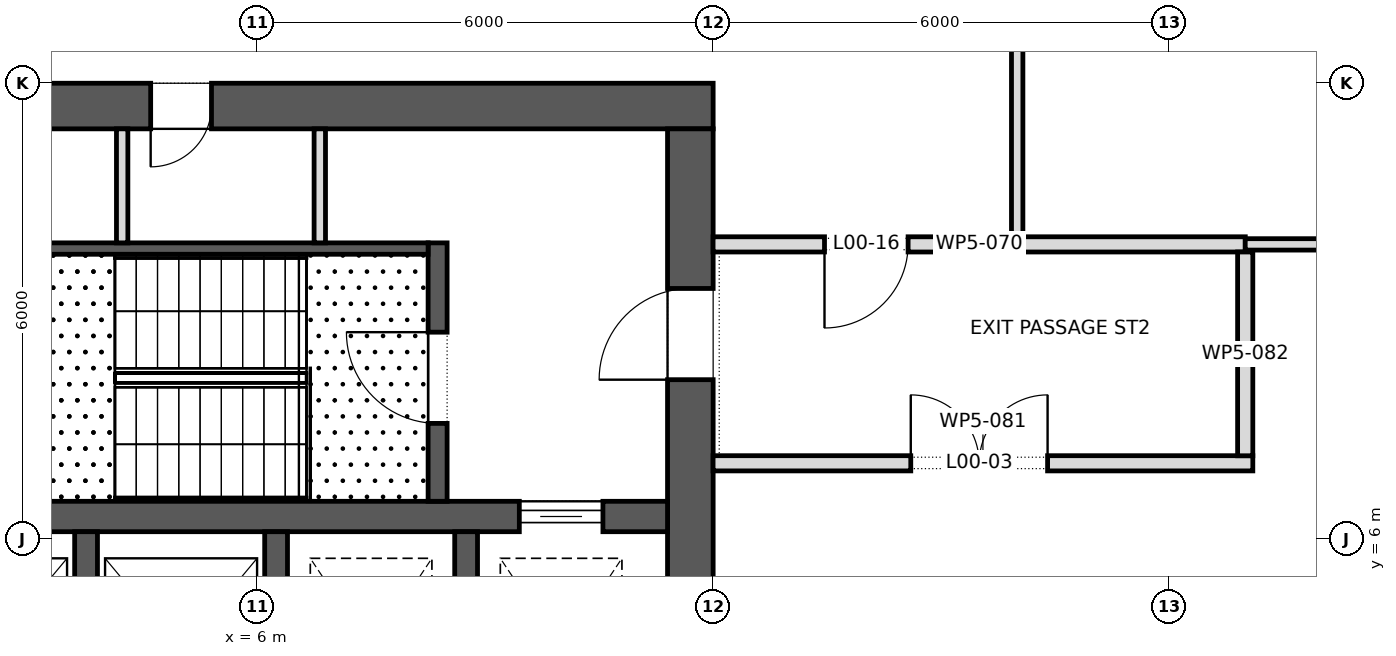
"""IFC4 building model, lengths in metres.
Left out: names, types, materials, properties, quantities, classifications, styles, units other than length and angle.
Written with IfcOpenShell. Run it as: python <this file> out.ifc"""

import sys

from ifc_helpers import new_model, si_unit, direction, frame, frame_2d, origin, place, context, subcontext, project, spatial, polyline, rectangle, outline, extrude, element, fill, save


model = new_model("IFC4")
c1 = context("Model", 3, precision=1e-05, world=origin(), true_north=direction((0.0, 1.0)))
c2 = subcontext(c1, "Body", "Model", "MODEL_VIEW")
j1 = project(units=[si_unit("LENGTHUNIT", "METRE"), si_unit("PLANEANGLEUNIT", "RADIAN")], contexts=[c1])
p1 = place(None, origin())
s1 = spatial("IfcSite", under=j1, at=p1, CompositionType="ELEMENT")
p2 = place(p1, origin())
s2 = spatial("IfcBuilding", under=s1, at=p2, CompositionType="ELEMENT")
p3 = place(p2, origin())
s3 = spatial("IfcBuildingStorey", under=s2, at=p3, CompositionType="ELEMENT", Elevation=0.0)
p4 = place(p3, frame((-12.0, 11.7, 0.0), z_axis=(0.0, 0.0, 1.0), x_axis=(1.0, 0.0, 0.0)))
e1 = element("IfcWall", 1, at=p4, inside=s3, PredefinedType="SHEAR", context=c2, shape_type="SweptSolid", body=[
    extrude(rectangle(XDim=24.0, YDim=0.6, at=frame_2d((12.0, 0.0))), origin(), (0.0, 0.0, 1.0), 7.0),
])
p5 = place(p4, frame((9.225, 0.0, 0.0)))
e2 = element("IfcOpeningElement", 2, at=p5, cuts=e1, PredefinedType="OPENING", context=c2, shape_type="SweptSolid", body=[
    extrude(rectangle(XDim=0.9, YDim=2.1, at=frame_2d((0.45, 1.05))), frame((0.0, 0.312, 0.0), z_axis=(0.0, -1.0, 0.0), x_axis=(1.0, 0.0, 0.0)), (0.0, 0.0, 1.0), 0.624),
])
p6 = place(p4, frame((10.925, 0.0, 0.0)))
e3 = element("IfcOpeningElement", 3, at=p6, cuts=e1, PredefinedType="OPENING", context=c2, shape_type="SweptSolid", body=[
    extrude(rectangle(XDim=0.8, YDim=2.1, at=frame_2d((0.4, 1.05))), frame((0.0, 0.312, 0.0), z_axis=(0.0, -1.0, 0.0), x_axis=(1.0, 0.0, 0.0)), (0.0, 0.0, 1.0), 0.624),
])
p7 = place(p4, frame((4.2, 0.0, 0.0)))
e4 = element("IfcOpeningElement", 4, at=p7, cuts=e1, PredefinedType="OPENING", context=c2, shape_type="SweptSolid", body=[
    extrude(rectangle(XDim=0.8, YDim=2.1, at=frame_2d((0.4, 1.05))), frame((0.0, 0.312, 0.0), z_axis=(0.0, -1.0, 0.0), x_axis=(1.0, 0.0, 0.0)), (0.0, 0.0, 1.0), 0.624),
])
p8 = place(p4, frame((13.8, 0.0, 0.0)))
e5 = element("IfcOpeningElement", 5, at=p8, cuts=e1, PredefinedType="OPENING", context=c2, shape_type="SweptSolid", body=[
    extrude(rectangle(XDim=0.8, YDim=2.1, at=frame_2d((0.4, 1.05))), frame((0.0, 0.312, 0.0), z_axis=(0.0, -1.0, 0.0), x_axis=(1.0, 0.0, 0.0)), (0.0, 0.0, 1.0), 0.624),
])
p9 = place(p4, frame((16.6, 0.0, 0.0)))
e6 = element("IfcOpeningElement", 6, at=p9, cuts=e1, PredefinedType="OPENING", context=c2, shape_type="SweptSolid", body=[
    extrude(rectangle(XDim=0.8, YDim=2.1, at=frame_2d((0.4, 1.05))), frame((0.0, 0.312, 0.0), z_axis=(0.0, -1.0, 0.0), x_axis=(1.0, 0.0, 0.0)), (0.0, 0.0, 1.0), 0.624),
])
p10 = place(p3, frame((11.7, -11.4, 0.0), z_axis=(0.0, 0.0, 1.0), x_axis=(0.0, 1.0, 0.0)))
e7 = element("IfcWall", 7, at=p10, inside=s3, PredefinedType="SHEAR", context=c2, shape_type="SweptSolid", body=[
    extrude(rectangle(XDim=22.8, YDim=0.6, at=frame_2d((11.4, 0.0))), origin(), (0.0, 0.0, 1.0), 7.0),
])
p11 = place(p10, frame((10.2, 0.0, 0.0)))
e8 = element("IfcOpeningElement", 8, at=p11, cuts=e7, PredefinedType="OPENING", context=c2, shape_type="SweptSolid", body=[
    extrude(rectangle(XDim=2.4, YDim=2.1, at=frame_2d((1.2, 1.05))), frame((0.0, 0.312, 0.0), z_axis=(0.0, -1.0, 0.0), x_axis=(1.0, 0.0, 0.0)), (0.0, 0.0, 1.0), 0.624),
])
p12 = place(p10, frame((19.5, 0.0, 0.0)))
e9 = element("IfcOpeningElement", 9, at=p12, cuts=e7, PredefinedType="OPENING", context=c2, shape_type="SweptSolid", body=[
    extrude(rectangle(XDim=1.2, YDim=2.1, at=frame_2d((0.6, 1.05))), frame((0.0, 0.312, 0.0), z_axis=(0.0, -1.0, 0.0), x_axis=(1.0, 0.0, 0.0)), (0.0, 0.0, 1.0), 0.624),
])
p13 = place(p10, frame((2.1, 0.0, 0.0)))
e10 = element("IfcOpeningElement", 10, at=p13, cuts=e7, PredefinedType="OPENING", context=c2, shape_type="SweptSolid", body=[
    extrude(rectangle(XDim=1.2, YDim=2.1, at=frame_2d((0.6, 1.05))), frame((0.0, 0.312, 0.0), z_axis=(0.0, -1.0, 0.0), x_axis=(1.0, 0.0, 0.0)), (0.0, 0.0, 1.0), 0.624),
])
p14 = place(p3, frame((-11.4, 6.3, 0.0), z_axis=(0.0, 0.0, 1.0), x_axis=(1.0, 0.0, 0.0)))
e11 = element("IfcWall", 11, at=p14, inside=s3, PredefinedType="SHEAR", context=c2, shape_type="SweptSolid", body=[
    extrude(rectangle(XDim=22.8, YDim=0.4, at=frame_2d((11.4, 0.0))), origin(), (0.0, 0.0, 1.0), 7.0),
])
p15 = place(p14, frame((20.85, 0.0, 0.0)))
e12 = element("IfcOpeningElement", 12, at=p15, cuts=e11, PredefinedType="OPENING", context=c2, shape_type="SweptSolid", body=[
    extrude(rectangle(XDim=1.1, YDim=2.1, at=frame_2d((0.55, 1.05))), frame((0.0, 0.212, 0.0), z_axis=(0.0, -1.0, 0.0), x_axis=(1.0, 0.0, 0.0)), (0.0, 0.0, 1.0), 0.424),
])
for number, where, z_axis, x_axis in (
    (13, (3.75, 3.2, 0.0), (0.0, 0.0, 1.0), (0.0, 1.0, 0.0)),
    (14, (6.25, 3.2, 0.0), (0.0, 0.0, 1.0), (0.0, 1.0, 0.0)),
    (15, (8.75, 3.2, 0.0), (0.0, 0.0, 1.0), (0.0, 1.0, 0.0)),
):
    element("IfcWall", number, at=place(p3, frame(where, z_axis=z_axis, x_axis=x_axis)), inside=s3, PredefinedType="SHEAR", context=c2, shape_type="SweptSolid", body=[
        extrude(rectangle(XDim=2.9, YDim=0.3, at=frame_2d((1.45, 0.0))), origin(), (0.0, 0.0, 1.0), 7.0),
    ])
p16 = place(p3, frame((8.375, 6.5, 0.0), z_axis=(0.0, 0.0, 1.0), x_axis=(0.0, 1.0, 0.0)))
e16 = element("IfcWall", 16, at=p16, inside=s3, PredefinedType="SHEAR", context=c2, shape_type="SweptSolid", body=[
    extrude(rectangle(XDim=3.4, YDim=0.25, at=frame_2d((1.7, 0.0))), origin(), (0.0, 0.0, 1.0), 6.65),
])
p17 = place(p16, frame((1.025, 0.0, 0.0)))
e17 = element("IfcOpeningElement", 17, at=p17, cuts=e16, PredefinedType="OPENING", context=c2, shape_type="SweptSolid", body=[
    extrude(rectangle(XDim=1.2, YDim=2.1, at=frame_2d((0.6, 1.05))), frame((0.0, 0.137, 0.0), z_axis=(0.0, -1.0, 0.0), x_axis=(1.0, 0.0, 0.0)), (0.0, 0.0, 1.0), 0.274),
])
p18 = place(p3, frame((0.25, 9.825, 0.0), z_axis=(0.0, 0.0, 1.0), x_axis=(1.0, 0.0, 0.0)))
e18 = element("IfcWall", 18, at=p18, inside=s3, PredefinedType="SHEAR", context=c2, shape_type="SweptSolid", body=[
    extrude(rectangle(XDim=8.0, YDim=0.15, at=frame_2d((4.0, 0.0))), origin(), (0.0, 0.0, 1.0), 6.65),
])
for number, where, z_axis, x_axis in (
    (19, (4.225, 9.9, 0.0), (0.0, 0.0, 1.0), (0.0, 1.0, 0.0)),
    (20, (6.825, 9.9, 0.0), (0.0, 0.0, 1.0), (0.0, 1.0, 0.0)),
):
    element("IfcWall", number, at=place(p3, frame(where, z_axis=z_axis, x_axis=x_axis)), inside=s3, PredefinedType="PARTITIONING", context=c2, shape_type="SweptSolid", body=[
        extrude(rectangle(XDim=1.5, YDim=0.15, at=frame_2d((0.75, 0.0))), origin(), (0.0, 0.0, 1.0), 6.65),
    ])
p19 = place(p3, frame((11.999, 9.88, 0.0), z_axis=(0.0, 0.0, 1.0), x_axis=(1.0, 0.0, 0.0)))
e21 = element("IfcWall", 21, at=p19, inside=s3, PredefinedType="PARTITIONING", context=c2, shape_type="SweptSolid", body=[
    extrude(rectangle(XDim=7.002, YDim=0.2, at=frame_2d((3.501, 0.0))), origin(), (0.0, 0.0, 1.0), 6.65),
])
p20 = place(p19, frame((1.466, 0.0, 0.0)))
e22 = element("IfcOpeningElement", 22, at=p20, cuts=e21, PredefinedType="OPENING", context=c2, shape_type="SweptSolid", body=[
    extrude(rectangle(XDim=1.1, YDim=2.1, at=frame_2d((0.55, 1.05))), frame((0.0, 0.112, 0.0), z_axis=(0.0, -1.0, 0.0), x_axis=(1.0, 0.0, 0.0)), (0.0, 0.0, 1.0), 0.224),
])
p21 = place(p3, frame((16.0, 23.926, 0.0), z_axis=(0.0, 0.0, 1.0), x_axis=(0.0, -1.0, 0.0)))
e23 = element("IfcWall", 23, at=p21, inside=s3, PredefinedType="PARTITIONING", context=c2, shape_type="SweptSolid", body=[
    extrude(rectangle(XDim=13.946, YDim=0.15, at=frame_2d((6.973, 0.0))), origin(), (0.0, 0.0, 1.0), 6.65),
])
p22 = place(p21, frame((5.786, 0.0, 0.0)))
e24 = element("IfcOpeningElement", 24, at=p22, cuts=e23, PredefinedType="OPENING", context=c2, shape_type="SweptSolid", body=[
    extrude(rectangle(XDim=2.4, YDim=2.1, at=frame_2d((1.2, 1.05))), frame((0.0, 0.087, 0.0), z_axis=(0.0, -1.0, 0.0), x_axis=(1.0, 0.0, 0.0)), (0.0, 0.0, 1.0), 0.174),
])
p23 = place(p3, frame((19.1, 7.0, 0.0), z_axis=(0.0, 0.0, 1.0), x_axis=(-1.0, 0.0, 0.0)))
e25 = element("IfcWall", 25, at=p23, inside=s3, PredefinedType="PARTITIONING", context=c2, shape_type="SweptSolid", body=[
    extrude(rectangle(XDim=7.101, YDim=0.2, at=frame_2d((3.551, 0.0))), origin(), (0.0, 0.0, 1.0), 6.65),
])
p24 = place(p23, frame((2.7, 0.0, 0.0)))
e26 = element("IfcOpeningElement", 26, at=p24, cuts=e25, PredefinedType="OPENING", context=c2, shape_type="SweptSolid", body=[
    extrude(rectangle(XDim=1.8, YDim=2.1, at=frame_2d((0.9, 1.05))), frame((0.0, 0.112, 0.0), z_axis=(0.0, -1.0, 0.0), x_axis=(1.0, 0.0, 0.0)), (0.0, 0.0, 1.0), 0.224),
])
p25 = place(p3, frame((19.0, 9.78, 0.0), z_axis=(0.0, 0.0, 1.0), x_axis=(0.0, -1.0, 0.0)))
e27 = element("IfcWall", 27, at=p25, inside=s3, PredefinedType="PARTITIONING", context=c2, shape_type="SweptSolid", body=[
    extrude(rectangle(XDim=2.681, YDim=0.2, at=frame_2d((1.34, 0.0))), origin(), (0.0, 0.0, 1.0), 6.65),
])
p26 = place(p3, frame((19.0, 9.88, 0.0), z_axis=(0.0, 0.0, 1.0), x_axis=(1.0, 0.0, 0.0)))
e28 = element("IfcWall", 28, at=p26, inside=s3, PredefinedType="PARTITIONING", context=c2, shape_type="SweptSolid", body=[
    extrude(outline(polyline([(0.0, -0.075), (16.667, -0.075), (16.633, 0.075), (0.0, 0.075), (0.0, -0.075)])), origin(), (0.0, 0.0, 1.0), 6.65),
])
p27 = place(p26, frame((7.405, 0.0, 0.0)))
e29 = element("IfcOpeningElement", 29, at=p27, cuts=e28, PredefinedType="OPENING", context=c2, shape_type="SweptSolid", body=[
    extrude(rectangle(XDim=1.8, YDim=2.1, at=frame_2d((0.9, 1.05))), frame((0.0, 0.087, 0.0), z_axis=(0.0, -1.0, 0.0), x_axis=(1.0, 0.0, 0.0)), (0.0, 0.0, 1.0), 0.174),
])
p28 = place(p15, origin())
e30 = element("IfcDoor", 30, at=p28, inside=s3, OperationType="SLIDING_TO_LEFT", PredefinedType="DOOR", context=c2, shape_type="SweptSolid", body=[
    extrude(rectangle(XDim=1.1, YDim=2.1, at=frame_2d((0.55, 1.05))), frame((0.0, 0.025, 0.0), z_axis=(0.0, -1.0, 0.0), x_axis=(1.0, 0.0, 0.0)), (0.0, 0.0, 1.0), 0.05),
])
fill(e12, e30)
p29 = place(p17, origin())
e31 = element("IfcDoor", 31, at=p29, inside=s3, OperationType="SINGLE_SWING_LEFT", PredefinedType="DOOR", context=c2, shape_type="SweptSolid", body=[
    extrude(rectangle(XDim=1.2, YDim=2.1, at=frame_2d((0.6, 1.05))), frame((0.0, 0.025, 0.0), z_axis=(0.0, -1.0, 0.0), x_axis=(1.0, 0.0, 0.0)), (0.0, 0.0, 1.0), 0.05),
])
fill(e17, e31)
p30 = place(p12, origin())
e32 = element("IfcDoor", 32, at=p30, inside=s3, OperationType="SINGLE_SWING_RIGHT", PredefinedType="DOOR", context=c2, shape_type="SweptSolid", body=[
    extrude(rectangle(XDim=1.2, YDim=2.1, at=frame_2d((0.6, 1.05))), frame((0.0, 0.025, 0.0), z_axis=(0.0, -1.0, 0.0), x_axis=(1.0, 0.0, 0.0)), (0.0, 0.0, 1.0), 0.05),
])
fill(e9, e32)
p31 = place(p9, frame((0.8, 0.0, 0.0), z_axis=(0.0, 0.0, 1.0), x_axis=(-1.0, 0.0, 0.0)))
e33 = element("IfcDoor", 33, at=p31, inside=s3, OperationType="SINGLE_SWING_LEFT", PredefinedType="DOOR", context=c2, shape_type="SweptSolid", body=[
    extrude(rectangle(XDim=0.8, YDim=2.1, at=frame_2d((0.4, 1.05))), frame((0.0, 0.025, 0.0), z_axis=(0.0, -1.0, 0.0), x_axis=(1.0, 0.0, 0.0)), (0.0, 0.0, 1.0), 0.05),
])
fill(e6, e33)
p32 = place(p24, frame((1.8, 0.0, 0.0), z_axis=(0.0, 0.0, 1.0), x_axis=(-1.0, 0.0, 0.0)))
e34 = element("IfcDoor", 34, at=p32, inside=s3, OperationType="DOUBLE_DOOR_SINGLE_SWING", PredefinedType="DOOR", context=c2, shape_type="SweptSolid", body=[
    extrude(rectangle(XDim=1.8, YDim=2.1, at=frame_2d((0.9, 1.05))), frame((0.0, 0.025, 0.0), z_axis=(0.0, -1.0, 0.0), x_axis=(1.0, 0.0, 0.0)), (0.0, 0.0, 1.0), 0.05),
])
fill(e26, e34)
p33 = place(p20, frame((1.1, 0.0, 0.0), z_axis=(0.0, 0.0, 1.0), x_axis=(-1.0, 0.0, 0.0)))
e35 = element("IfcDoor", 35, at=p33, inside=s3, OperationType="SINGLE_SWING_LEFT", PredefinedType="DOOR", context=c2, shape_type="SweptSolid", body=[
    extrude(rectangle(XDim=1.1, YDim=2.1, at=frame_2d((0.55, 1.05))), frame((0.0, 0.025, 0.0), z_axis=(0.0, -1.0, 0.0), x_axis=(1.0, 0.0, 0.0)), (0.0, 0.0, 1.0), 0.05),
])
fill(e22, e35)
save(model, sys.argv[1])
